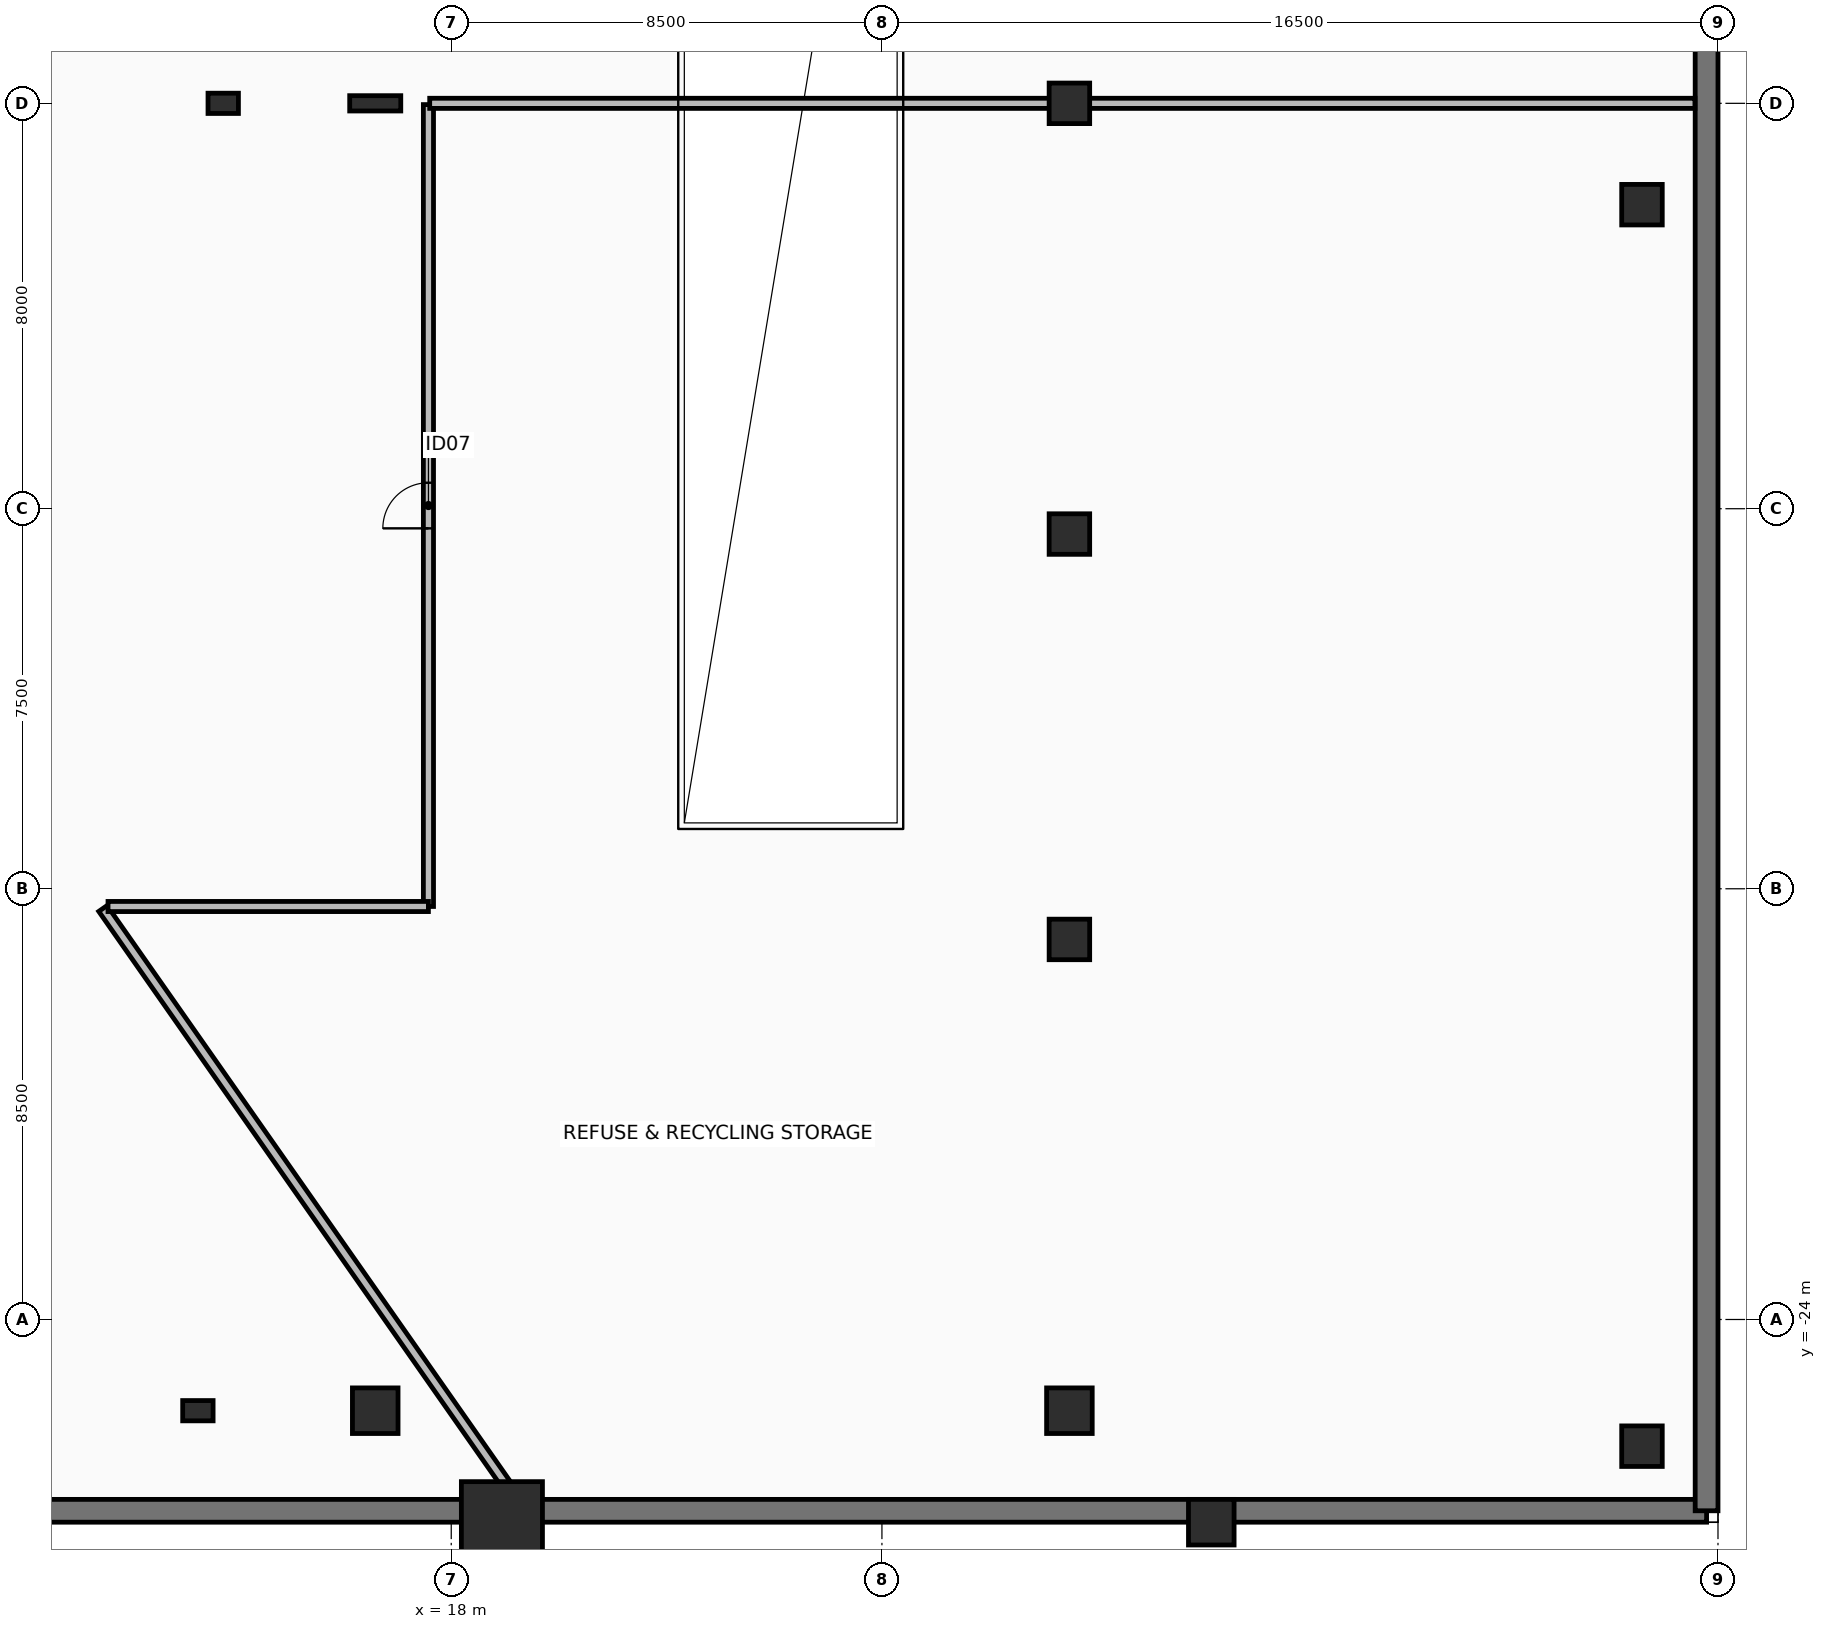
"""IFC4 building model, lengths in metres.
Left out: names, types, materials, properties, quantities, classifications, styles, units other than length and angle.
Written with IfcOpenShell. Run it as: python <this file> out.ifc"""

import sys

from ifc_helpers import new_model, si_unit, direction, frame, frame_2d, origin, origin_2d, place, context, subcontext, project, spatial, rectangle, hollow_rectangle, i_section, extrude, element, fill, save


model = new_model("IFC4")
c1 = context("Model", 3, precision=1e-05, world=origin(), true_north=direction((0.0, 1.0)))
c2 = subcontext(c1, "Body", "Model", "MODEL_VIEW")
j1 = project(units=[si_unit("LENGTHUNIT", "METRE"), si_unit("PLANEANGLEUNIT", "RADIAN")], contexts=[c1])
p1 = place(None, origin())
s1 = spatial("IfcSite", under=j1, at=p1, CompositionType="ELEMENT")
p2 = place(p1, origin())
s2 = spatial("IfcBuilding", under=s1, at=p2, CompositionType="ELEMENT")
p3 = place(p2, frame((0.0, 0.0, -4.5)))
s3 = spatial("IfcBuildingStorey", under=s2, at=p3, CompositionType="ELEMENT", Elevation=-4.5)
for number, where, z_axis, x_axis in (
    (1, (13.5, 0.0, 0.0), (0.0, 0.0, 1.0), (1.0, 0.0, 0.0)),
    (2, (13.0, -25.8, 0.0), (0.0, 0.0, 1.0), (1.0, 0.0, 0.0)),
):
    element("IfcColumn", number, at=place(p3, frame(where, z_axis=z_axis, x_axis=x_axis)), inside=s3, PredefinedType="PILASTER", context=c2, shape_type="SweptSolid", body=[
        extrude(rectangle(XDim=0.6, YDim=0.4, at=origin_2d()), origin(), (0.0, 0.0, 1.0), 4.5),
    ])
for number, where, z_axis, x_axis in (
    (3, (16.5, -25.8, 0.0), (0.0, 0.0, 1.0), (1.0, 0.0, 0.0)),
    (4, (30.2, -25.8, 0.0), (0.0, 0.0, 1.0), (1.0, 0.0, 0.0)),
):
    element("IfcColumn", number, at=place(p3, frame(where, z_axis=z_axis, x_axis=x_axis)), inside=s3, PredefinedType="COLUMN", context=c2, shape_type="SweptSolid", body=[
        extrude(hollow_rectangle(XDim=0.9, YDim=0.9, WallThickness=0.05, at=origin_2d()), origin(), (0.0, 0.0, 1.0), 4.5),
    ])
for number, where, z_axis, x_axis in (
    (5, (30.2, -16.5, 0.0), (0.0, 0.0, 1.0), (1.0, 0.0, 0.0)),
    (6, (30.2, -8.5, 0.0), (0.0, 0.0, 1.0), (1.0, 0.0, 0.0)),
    (7, (30.2, 0.0, 0.0), (0.0, 0.0, 1.0), (1.0, 0.0, 0.0)),
):
    element("IfcColumn", number, at=place(p3, frame(where, z_axis=z_axis, x_axis=x_axis)), inside=s3, PredefinedType="COLUMN", context=c2, shape_type="SweptSolid", body=[
        extrude(hollow_rectangle(XDim=0.8, YDim=0.8, WallThickness=0.045, at=origin_2d()), origin(), (0.0, 0.0, 1.0), 4.5),
    ])
p4 = place(p3, frame((16.5, 0.0, 0.0), z_axis=(0.0, 0.0, 1.0), x_axis=(1.0, 0.0, 0.0)))
e8 = element("IfcColumn", 8, at=p4, inside=s3, PredefinedType="COLUMN", context=c2, shape_type="SweptSolid", body=[
    extrude(i_section(OverallWidth=0.302, OverallDepth=1.008, WebThickness=0.021, FlangeThickness=0.04, at=origin_2d()), origin(), (0.0, 0.0, 1.0), 4.5),
])
p5 = place(p3, frame((19.0, -28.0, 0.0), z_axis=(0.0, 0.0, 1.0), x_axis=(1.0, 0.0, 0.0)))
e9 = element("IfcColumn", 9, at=p5, inside=s3, PredefinedType="COLUMN", context=c2, shape_type="SweptSolid", body=[
    extrude(rectangle(XDim=1.6, YDim=1.6, at=origin_2d()), origin(), (0.0, 0.0, 1.0), 4.5),
])
p6 = place(p3, frame((33.0, -28.0, 0.0), z_axis=(0.0, 0.0, 1.0), x_axis=(1.0, 0.0, 0.0)))
e10 = element("IfcColumn", 10, at=p6, inside=s3, PredefinedType="COLUMN", context=c2, shape_type="SweptSolid", body=[
    extrude(hollow_rectangle(XDim=0.9, YDim=0.9, WallThickness=0.05, at=origin_2d()), origin(), (0.0, 0.0, 1.0), 4.5),
])
for number, where, z_axis, x_axis in (
    (11, (41.5, -26.5, 0.0), (0.0, 0.0, 1.0), (1.0, 0.0, 0.0)),
    (12, (41.5, -2.0, 0.0), (0.0, 0.0, 1.0), (1.0, 0.0, 0.0)),
):
    element("IfcColumn", number, at=place(p3, frame(where, z_axis=z_axis, x_axis=x_axis)), inside=s3, PredefinedType="COLUMN", context=c2, shape_type="SweptSolid", body=[
        extrude(hollow_rectangle(XDim=0.8, YDim=0.8, WallThickness=0.045, at=origin_2d()), origin(), (0.0, 0.0, 1.0), 4.5),
    ])
p7 = place(p3, frame((-42.775, -27.775, 0.0), z_axis=(0.0, 0.0, 1.0), x_axis=(1.0, 0.0, 0.0)))
e13 = element("IfcWall", 13, at=p7, inside=s3, PredefinedType="STANDARD", context=c2, shape_type="SweptSolid", body=[
    extrude(rectangle(XDim=85.55, YDim=0.45, at=frame_2d((42.775, 0.0))), origin(), (0.0, 0.0, 1.0), 4.2),
])
p8 = place(p3, frame((42.775, -27.775, 0.0), z_axis=(0.0, 0.0, 1.0), x_axis=(0.0, 1.0, 0.0)))
e14 = element("IfcWall", 14, at=p8, inside=s3, PredefinedType="STANDARD", context=c2, shape_type="SweptSolid", body=[
    extrude(rectangle(XDim=54.35, YDim=0.45, at=frame_2d((27.175, 0.0))), origin(), (0.0, 0.0, 1.0), 4.2),
])
p9 = place(p3, frame((17.55, -15.849, 0.0), z_axis=(0.0, 0.0, 1.0), x_axis=(0.0, 1.0, 0.0)))
e15 = element("IfcWall", 15, at=p9, inside=s3, PredefinedType="PARTITIONING", context=c2, shape_type="SweptSolid", body=[
    extrude(rectangle(XDim=15.824, YDim=0.2, at=frame_2d((7.912, 0.0))), origin(), (0.0, 0.0, 1.0), 3.545),
])
p10 = place(p9, frame((7.462, 0.0, 0.0)))
e16 = element("IfcOpeningElement", 16, at=p10, cuts=e15, PredefinedType="OPENING", context=c2, shape_type="SweptSolid", body=[
    extrude(rectangle(XDim=0.9, YDim=2.1, at=frame_2d((0.45, 1.05))), frame((0.0, 0.11, 0.0), z_axis=(0.0, -1.0, 0.0), x_axis=(1.0, 0.0, 0.0)), (0.0, 0.0, 1.0), 0.22),
])
p11 = place(p3, frame((17.575, 0.0, 0.0), z_axis=(0.0, 0.0, 1.0), x_axis=(1.0, 0.0, 0.0)))
e17 = element("IfcWall", 17, at=p11, inside=s3, PredefinedType="PARTITIONING", context=c2, shape_type="SweptSolid", body=[
    extrude(rectangle(XDim=24.97, YDim=0.2, at=frame_2d((12.485, 0.0))), origin(), (0.0, 0.0, 1.0), 3.395),
])
p12 = place(p3, frame((19.287, -27.545, 0.0), z_axis=(0.0, 0.0, 1.0), x_axis=(-0.573592461677, 0.819140823001, 0.0)))
e18 = element("IfcWall", 18, at=p12, inside=s3, PredefinedType="PARTITIONING", context=c2, shape_type="SweptSolid", body=[
    extrude(rectangle(XDim=14.229, YDim=0.2, at=frame_2d((7.115, 0.0))), origin(), (0.0, 0.0, 1.0), 3.295),
])
p13 = place(p3, frame((11.227, -15.85, 0.0), z_axis=(0.0, 0.0, 1.0), x_axis=(1.0, 0.0, 0.0)))
e19 = element("IfcWall", 19, at=p13, inside=s3, PredefinedType="PARTITIONING", context=c2, shape_type="SweptSolid", body=[
    extrude(rectangle(XDim=6.323, YDim=0.2, at=frame_2d((3.161, 0.0))), origin(), (0.0, 0.0, 1.0), 3.545),
])
p14 = place(p10, origin())
e20 = element("IfcDoor", 20, at=p14, inside=s3, OperationType="SINGLE_SWING_LEFT", PredefinedType="DOOR", context=c2, shape_type="SweptSolid", body=[
    extrude(rectangle(XDim=0.9, YDim=2.1, at=frame_2d((0.45, 1.05))), frame((0.0, 0.025, 0.0), z_axis=(0.0, -1.0, 0.0), x_axis=(1.0, 0.0, 0.0)), (0.0, 0.0, 1.0), 0.05),
])
fill(e16, e20)
save(model, sys.argv[1])
